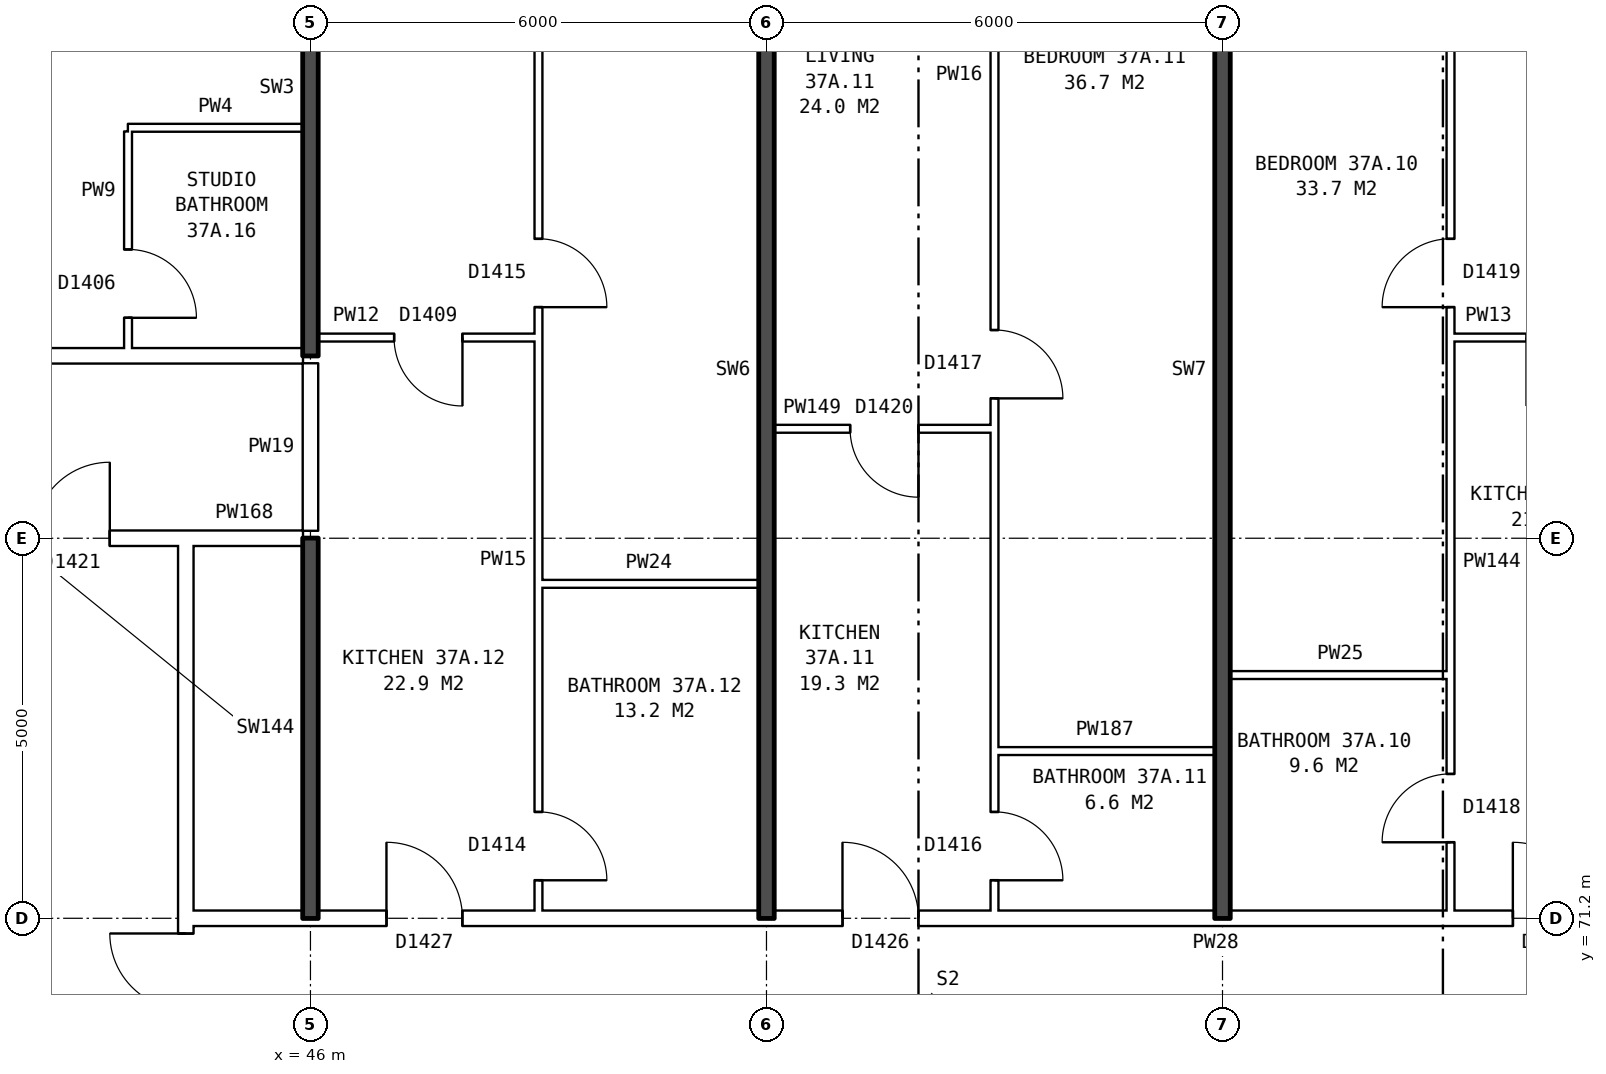
"""IFC4 building model, lengths in metres.
Left out: names, types, materials, properties, quantities, classifications, styles, units other than length and angle.
Written with IfcOpenShell. Run it as: python <this file> out.ifc"""

import sys

from ifc_helpers import new_model, si_unit, direction, frame, frame_2d, origin, place, context, subcontext, project, spatial, rectangle, extrude, element, fill, save


model = new_model("IFC4")
c1 = context("Model", 3, precision=1e-05, world=origin(), true_north=direction((0.0, 1.0)))
c2 = subcontext(c1, "Body", "Model", "MODEL_VIEW")
j1 = project(units=[si_unit("LENGTHUNIT", "METRE"), si_unit("PLANEANGLEUNIT", "RADIAN")], contexts=[c1])
p1 = place(None, origin())
s1 = spatial("IfcSite", under=j1, at=p1, CompositionType="ELEMENT")
p2 = place(p1, origin())
s2 = spatial("IfcBuilding", under=s1, at=p2, CompositionType="ELEMENT")
p3 = place(p2, frame((0.0, 0.0, 133.0)))
s3 = spatial("IfcBuildingStorey", under=s2, at=p3, CompositionType="ELEMENT", Elevation=133.0)
p4 = place(p3, frame((44.36, 63.9, 0.0), z_axis=(0.0, 0.0, 1.0), x_axis=(0.0, 1.0, 0.0)))
e1 = element("IfcWall", 1, at=p4, inside=s3, PredefinedType="PARTITIONING", context=c2, shape_type="SweptSolid", body=[
    extrude(rectangle(XDim=12.2, YDim=0.2, at=frame_2d((6.1, 0.0))), origin(), (0.0, 0.0, 1.0), 2.85),
])
p5 = place(p4, frame((5.1, 0.0, 0.0)))
e2 = element("IfcOpeningElement", 2, at=p5, cuts=e1, PredefinedType="OPENING", context=c2, shape_type="SweptSolid", body=[
    extrude(rectangle(XDim=2.0, YDim=2.1, at=frame_2d((1.0, 1.05))), frame((0.0, 0.11, 0.0), z_axis=(0.0, -1.0, 0.0), x_axis=(1.0, 0.0, 0.0)), (0.0, 0.0, 1.0), 0.22),
])
p6 = place(p3, frame((44.36, 71.2, 0.0), z_axis=(0.0, 0.0, 1.0), x_axis=(1.0, 0.0, 0.0)))
e3 = element("IfcWall", 3, at=p6, inside=s3, PredefinedType="PARTITIONING", context=c2, shape_type="SweptSolid", body=[
    extrude(rectangle(XDim=19.28, YDim=0.2, at=frame_2d((9.64, 0.0))), origin(), (0.0, 0.0, 1.0), 2.85),
])
p7 = place(p6, frame((17.46, 0.0, 0.0)))
e4 = element("IfcOpeningElement", 4, at=p7, cuts=e3, PredefinedType="OPENING", context=c2, shape_type="SweptSolid", body=[
    extrude(rectangle(XDim=1.0, YDim=2.1, at=frame_2d((0.5, 1.05))), frame((0.0, 0.11, 0.0), z_axis=(0.0, -1.0, 0.0), x_axis=(1.0, 0.0, 0.0)), (0.0, 0.0, 1.0), 0.22),
])
p8 = place(p6, frame((8.64, 0.0, 0.0)))
e5 = element("IfcOpeningElement", 5, at=p8, cuts=e3, PredefinedType="OPENING", context=c2, shape_type="SweptSolid", body=[
    extrude(rectangle(XDim=1.0, YDim=2.1, at=frame_2d((0.5, 1.05))), frame((0.0, 0.11, 0.0), z_axis=(0.0, -1.0, 0.0), x_axis=(1.0, 0.0, 0.0)), (0.0, 0.0, 1.0), 0.22),
])
p9 = place(p6, frame((2.64, 0.0, 0.0)))
e6 = element("IfcOpeningElement", 6, at=p9, cuts=e3, PredefinedType="OPENING", context=c2, shape_type="SweptSolid", body=[
    extrude(rectangle(XDim=1.0, YDim=2.1, at=frame_2d((0.5, 1.05))), frame((0.0, 0.11, 0.0), z_axis=(0.0, -1.0, 0.0), x_axis=(1.0, 0.0, 0.0)), (0.0, 0.0, 1.0), 0.22),
])
for number, where, z_axis, x_axis in (
    (7, (55.0, 73.4, 0.0), (0.0, 0.0, 1.0), (1.0, 0.0, 0.0)),
    (8, (58.1, 74.4, 0.0), (0.0, 0.0, 1.0), (1.0, 0.0, 0.0)),
    (9, (49.0, 75.6, 0.0), (0.0, 0.0, 1.0), (1.0, 0.0, 0.0)),
):
    element("IfcWall", number, at=place(p3, frame(where, z_axis=z_axis, x_axis=x_axis)), inside=s3, PredefinedType="PARTITIONING", context=c2, shape_type="SweptSolid", body=[
        extrude(rectangle(XDim=2.9, YDim=0.1, at=frame_2d((1.45, 0.0))), origin(), (0.0, 0.0, 1.0), 2.85),
    ])
p10 = place(p3, frame((41.36, 76.2, 0.0), z_axis=(0.0, 0.0, 1.0), x_axis=(1.0, 0.0, 0.0)))
e10 = element("IfcWall", 10, at=p10, inside=s3, PredefinedType="PARTITIONING", context=c2, shape_type="SweptSolid", body=[
    extrude(rectangle(XDim=3.0, YDim=0.2, at=frame_2d((1.5, 0.0))), origin(), (0.0, 0.0, 1.0), 2.85),
])
p11 = place(p10, frame((1.0, 0.0, 0.0)))
e11 = element("IfcOpeningElement", 11, at=p11, cuts=e10, PredefinedType="OPENING", context=c2, shape_type="SweptSolid", body=[
    extrude(rectangle(XDim=1.0, YDim=2.1, at=frame_2d((0.5, 1.05))), frame((0.0, 0.11, 0.0), z_axis=(0.0, -1.0, 0.0), x_axis=(1.0, 0.0, 0.0)), (0.0, 0.0, 1.0), 0.22),
])
p12 = place(p3, frame((44.36, 76.2, 0.0), z_axis=(0.0, 0.0, 1.0), x_axis=(1.0, 0.0, 0.0)))
e12 = element("IfcWall", 12, at=p12, inside=s3, PredefinedType="PARTITIONING", context=c2, shape_type="SweptSolid", body=[
    extrude(rectangle(XDim=1.54, YDim=0.2, at=frame_2d((0.77, 0.0))), origin(), (0.0, 0.0, 1.0), 2.85),
])
p13 = place(p3, frame((52.1, 77.64, 0.0), z_axis=(0.0, 0.0, 1.0), x_axis=(1.0, 0.0, 0.0)))
e13 = element("IfcWall", 13, at=p13, inside=s3, PredefinedType="PARTITIONING", context=c2, shape_type="SweptSolid", body=[
    extrude(rectangle(XDim=2.9, YDim=0.1, at=frame_2d((1.45, 0.0))), origin(), (0.0, 0.0, 1.0), 2.85),
])
p14 = place(p13, frame((1.0, 0.0, 0.0)))
e14 = element("IfcOpeningElement", 14, at=p14, cuts=e13, PredefinedType="OPENING", context=c2, shape_type="SweptSolid", body=[
    extrude(rectangle(XDim=0.9, YDim=2.1, at=frame_2d((0.45, 1.05))), frame((0.0, 0.06, 0.0), z_axis=(0.0, -1.0, 0.0), x_axis=(1.0, 0.0, 0.0)), (0.0, 0.0, 1.0), 0.12),
])
p15 = place(p3, frame((27.11, 78.6, 0.0), z_axis=(0.0, 0.0, 1.0), x_axis=(1.0, 0.0, 0.0)))
e15 = element("IfcWall", 15, at=p15, inside=s3, PredefinedType="PARTITIONING", context=c2, shape_type="SweptSolid", body=[
    extrude(rectangle(XDim=18.79, YDim=0.2, at=frame_2d((9.395, 0.0))), origin(), (0.0, 0.0, 1.0), 2.85),
])
p16 = place(p15, frame((14.19, 0.0, 0.0)))
e16 = element("IfcOpeningElement", 16, at=p16, cuts=e15, PredefinedType="OPENING", context=c2, shape_type="SweptSolid", body=[
    extrude(rectangle(XDim=1.0, YDim=2.1, at=frame_2d((0.5, 1.05))), frame((0.0, 0.11, 0.0), z_axis=(0.0, -1.0, 0.0), x_axis=(1.0, 0.0, 0.0)), (0.0, 0.0, 1.0), 0.22),
])
p17 = place(p15, frame((8.19, 0.0, 0.0)))
e17 = element("IfcOpeningElement", 17, at=p17, cuts=e15, PredefinedType="OPENING", context=c2, shape_type="SweptSolid", body=[
    extrude(rectangle(XDim=1.0, YDim=2.1, at=frame_2d((0.5, 1.05))), frame((0.0, 0.11, 0.0), z_axis=(0.0, -1.0, 0.0), x_axis=(1.0, 0.0, 0.0)), (0.0, 0.0, 1.0), 0.22),
])
p18 = place(p15, frame((4.59, 0.0, 0.0)))
e18 = element("IfcOpeningElement", 18, at=p18, cuts=e15, PredefinedType="OPENING", context=c2, shape_type="SweptSolid", body=[
    extrude(rectangle(XDim=1.0, YDim=2.1, at=frame_2d((0.5, 1.05))), frame((0.0, 0.11, 0.0), z_axis=(0.0, -1.0, 0.0), x_axis=(1.0, 0.0, 0.0)), (0.0, 0.0, 1.0), 0.22),
])
p19 = place(p3, frame((46.1, 78.84, 0.0), z_axis=(0.0, 0.0, 1.0), x_axis=(1.0, 0.0, 0.0)))
e19 = element("IfcWall", 19, at=p19, inside=s3, PredefinedType="PARTITIONING", context=c2, shape_type="SweptSolid", body=[
    extrude(rectangle(XDim=2.9, YDim=0.1, at=frame_2d((1.45, 0.0))), origin(), (0.0, 0.0, 1.0), 2.85),
])
p20 = place(p19, frame((1.0, 0.0, 0.0)))
e20 = element("IfcOpeningElement", 20, at=p20, cuts=e19, PredefinedType="OPENING", context=c2, shape_type="SweptSolid", body=[
    extrude(rectangle(XDim=0.9, YDim=2.1, at=frame_2d((0.45, 1.05))), frame((0.0, 0.06, 0.0), z_axis=(0.0, -1.0, 0.0), x_axis=(1.0, 0.0, 0.0)), (0.0, 0.0, 1.0), 0.12),
])
p21 = place(p3, frame((61.0, 78.84, 0.0), z_axis=(0.0, 0.0, 1.0), x_axis=(1.0, 0.0, 0.0)))
e21 = element("IfcWall", 21, at=p21, inside=s3, PredefinedType="PARTITIONING", context=c2, shape_type="SweptSolid", body=[
    extrude(rectangle(XDim=2.9, YDim=0.1, at=frame_2d((1.45, 0.0))), origin(), (0.0, 0.0, 1.0), 2.85),
])
p22 = place(p21, frame((1.0, 0.0, 0.0)))
e22 = element("IfcOpeningElement", 22, at=p22, cuts=e21, PredefinedType="OPENING", context=c2, shape_type="SweptSolid", body=[
    extrude(rectangle(XDim=0.9, YDim=2.1, at=frame_2d((0.45, 1.05))), frame((0.0, 0.06, 0.0), z_axis=(0.0, -1.0, 0.0), x_axis=(1.0, 0.0, 0.0)), (0.0, 0.0, 1.0), 0.12),
])
p23 = place(p3, frame((43.6, 81.6, 0.0), z_axis=(0.0, 0.0, 1.0), x_axis=(1.0, 0.0, 0.0)))
e23 = element("IfcWall", 23, at=p23, inside=s3, PredefinedType="PARTITIONING", context=c2, shape_type="SweptSolid", body=[
    extrude(rectangle(XDim=2.3, YDim=0.1, at=frame_2d((1.15, 0.0))), origin(), (0.0, 0.0, 1.0), 2.85),
])
p24 = place(p3, frame((43.6, 78.7, 0.0), z_axis=(0.0, 0.0, 1.0), x_axis=(0.0, 1.0, 0.0)))
e24 = element("IfcWall", 24, at=p24, inside=s3, PredefinedType="PARTITIONING", context=c2, shape_type="SweptSolid", body=[
    extrude(rectangle(XDim=2.85, YDim=0.1, at=frame_2d((1.425, 0.0))), origin(), (0.0, 0.0, 1.0), 2.85),
])
p25 = place(p24, frame((0.4, 0.0, 0.0)))
e25 = element("IfcOpeningElement", 25, at=p25, cuts=e24, PredefinedType="OPENING", context=c2, shape_type="SweptSolid", body=[
    extrude(rectangle(XDim=0.9, YDim=2.1, at=frame_2d((0.45, 1.05))), frame((0.0, 0.06, 0.0), z_axis=(0.0, -1.0, 0.0), x_axis=(1.0, 0.0, 0.0)), (0.0, 0.0, 1.0), 0.12),
])
p26 = place(p3, frame((46.0, 71.2, 0.0), z_axis=(0.0, 0.0, 1.0), x_axis=(0.0, 1.0, 0.0)))
e26 = element("IfcWall", 26, at=p26, inside=s3, PredefinedType="SOLIDWALL", context=c2, shape_type="SweptSolid", body=[
    extrude(rectangle(XDim=5.0, YDim=0.2, at=frame_2d((2.5, 0.0))), origin(), (0.0, 0.0, 1.0), 2.85),
])
p27 = place(p3, frame((46.0, 76.3, 0.0), z_axis=(0.0, 0.0, 1.0), x_axis=(0.0, 1.0, 0.0)))
e27 = element("IfcWall", 27, at=p27, inside=s3, PredefinedType="PARTITIONING", context=c2, shape_type="SweptSolid", body=[
    extrude(rectangle(XDim=2.2, YDim=0.2, at=frame_2d((1.1, 0.0))), origin(), (0.0, 0.0, 1.0), 2.85),
])
p28 = place(p3, frame((46.0, 78.6, 0.0), z_axis=(0.0, 0.0, 1.0), x_axis=(0.0, 1.0, 0.0)))
e28 = element("IfcWall", 28, at=p28, inside=s3, PredefinedType="SOLIDWALL", context=c2, shape_type="SweptSolid", body=[
    extrude(rectangle(XDim=7.04, YDim=0.2, at=frame_2d((3.52, 0.0))), origin(), (0.0, 0.0, 1.0), 2.85),
])
p29 = place(p3, frame((49.0, 71.3, 0.0), z_axis=(0.0, 0.0, 1.0), x_axis=(0.0, 1.0, 0.0)))
e29 = element("IfcWall", 29, at=p29, inside=s3, PredefinedType="PARTITIONING", context=c2, shape_type="SweptSolid", body=[
    extrude(rectangle(XDim=14.34, YDim=0.1, at=frame_2d((7.17, 0.0))), origin(), (0.0, 0.0, 1.0), 2.85),
])
p30 = place(p29, frame((7.94, 0.0, 0.0)))
e30 = element("IfcOpeningElement", 30, at=p30, cuts=e29, PredefinedType="OPENING", context=c2, shape_type="SweptSolid", body=[
    extrude(rectangle(XDim=0.9, YDim=2.1, at=frame_2d((0.45, 1.05))), frame((0.0, 0.06, 0.0), z_axis=(0.0, -1.0, 0.0), x_axis=(1.0, 0.0, 0.0)), (0.0, 0.0, 1.0), 0.12),
])
p31 = place(p29, frame((0.4, 0.0, 0.0)))
e31 = element("IfcOpeningElement", 31, at=p31, cuts=e29, PredefinedType="OPENING", context=c2, shape_type="SweptSolid", body=[
    extrude(rectangle(XDim=0.9, YDim=2.1, at=frame_2d((0.45, 1.05))), frame((0.0, 0.06, 0.0), z_axis=(0.0, -1.0, 0.0), x_axis=(1.0, 0.0, 0.0)), (0.0, 0.0, 1.0), 0.12),
])
p32 = place(p3, frame((52.0, 71.2, 0.0), z_axis=(0.0, 0.0, 1.0), x_axis=(0.0, 1.0, 0.0)))
e32 = element("IfcWall", 32, at=p32, inside=s3, PredefinedType="SOLIDWALL", context=c2, shape_type="SweptSolid", body=[
    extrude(rectangle(XDim=14.44, YDim=0.2, at=frame_2d((7.22, 0.0))), origin(), (0.0, 0.0, 1.0), 2.85),
])
p33 = place(p3, frame((55.0, 71.3, 0.0), z_axis=(0.0, 0.0, 1.0), x_axis=(0.0, 1.0, 0.0)))
e33 = element("IfcWall", 33, at=p33, inside=s3, PredefinedType="PARTITIONING", context=c2, shape_type="SweptSolid", body=[
    extrude(rectangle(XDim=14.34, YDim=0.1, at=frame_2d((7.17, 0.0))), origin(), (0.0, 0.0, 1.0), 2.85),
])
p34 = place(p33, frame((6.74, 0.0, 0.0)))
e34 = element("IfcOpeningElement", 34, at=p34, cuts=e33, PredefinedType="OPENING", context=c2, shape_type="SweptSolid", body=[
    extrude(rectangle(XDim=0.9, YDim=2.1, at=frame_2d((0.45, 1.05))), frame((0.0, 0.06, 0.0), z_axis=(0.0, -1.0, 0.0), x_axis=(1.0, 0.0, 0.0)), (0.0, 0.0, 1.0), 0.12),
])
p35 = place(p33, frame((0.4, 0.0, 0.0)))
e35 = element("IfcOpeningElement", 35, at=p35, cuts=e33, PredefinedType="OPENING", context=c2, shape_type="SweptSolid", body=[
    extrude(rectangle(XDim=0.9, YDim=2.1, at=frame_2d((0.45, 1.05))), frame((0.0, 0.06, 0.0), z_axis=(0.0, -1.0, 0.0), x_axis=(1.0, 0.0, 0.0)), (0.0, 0.0, 1.0), 0.12),
])
p36 = place(p3, frame((58.0, 71.2, 0.0), z_axis=(0.0, 0.0, 1.0), x_axis=(0.0, 1.0, 0.0)))
e36 = element("IfcWall", 36, at=p36, inside=s3, PredefinedType="SOLIDWALL", context=c2, shape_type="SweptSolid", body=[
    extrude(rectangle(XDim=14.44, YDim=0.2, at=frame_2d((7.22, 0.0))), origin(), (0.0, 0.0, 1.0), 2.85),
])
p37 = place(p3, frame((61.0, 71.3, 0.0), z_axis=(0.0, 0.0, 1.0), x_axis=(0.0, 1.0, 0.0)))
e37 = element("IfcWall", 37, at=p37, inside=s3, PredefinedType="PARTITIONING", context=c2, shape_type="SweptSolid", body=[
    extrude(rectangle(XDim=14.34, YDim=0.1, at=frame_2d((7.17, 0.0))), origin(), (0.0, 0.0, 1.0), 2.85),
])
p38 = place(p37, frame((7.94, 0.0, 0.0)))
e38 = element("IfcOpeningElement", 38, at=p38, cuts=e37, PredefinedType="OPENING", context=c2, shape_type="SweptSolid", body=[
    extrude(rectangle(XDim=0.9, YDim=2.1, at=frame_2d((0.45, 1.05))), frame((0.0, 0.06, 0.0), z_axis=(0.0, -1.0, 0.0), x_axis=(1.0, 0.0, 0.0)), (0.0, 0.0, 1.0), 0.12),
])
p39 = place(p37, frame((0.9, 0.0, 0.0)))
e39 = element("IfcOpeningElement", 39, at=p39, cuts=e37, PredefinedType="OPENING", context=c2, shape_type="SweptSolid", body=[
    extrude(rectangle(XDim=0.9, YDim=2.1, at=frame_2d((0.45, 1.05))), frame((0.0, 0.06, 0.0), z_axis=(0.0, -1.0, 0.0), x_axis=(1.0, 0.0, 0.0)), (0.0, 0.0, 1.0), 0.12),
])
p40 = place(p5, origin())
e40 = element("IfcDoor", 40, at=p40, inside=s3, OperationType="DOUBLE_DOOR_SINGLE_SWING", PredefinedType="DOOR", context=c2, shape_type="SweptSolid", body=[
    extrude(rectangle(XDim=2.0, YDim=2.1, at=frame_2d((1.0, 1.05))), frame((0.0, 0.025, 0.0), z_axis=(0.0, -1.0, 0.0), x_axis=(1.0, 0.0, 0.0)), (0.0, 0.0, 1.0), 0.05),
])
fill(e2, e40)
p41 = place(p11, origin())
e41 = element("IfcDoor", 41, at=p41, inside=s3, OperationType="SINGLE_SWING_RIGHT", PredefinedType="DOOR", context=c2, shape_type="SweptSolid", body=[
    extrude(rectangle(XDim=1.0, YDim=2.1, at=frame_2d((0.5, 1.05))), frame((0.0, 0.025, 0.0), z_axis=(0.0, -1.0, 0.0), x_axis=(1.0, 0.0, 0.0)), (0.0, 0.0, 1.0), 0.05),
])
fill(e11, e41)
p42 = place(p38, origin())
e42 = element("IfcDoor", 42, at=p42, inside=s3, OperationType="SINGLE_SWING_LEFT", PredefinedType="DOOR", context=c2, shape_type="SweptSolid", body=[
    extrude(rectangle(XDim=0.9, YDim=2.1, at=frame_2d((0.45, 1.05))), frame((0.0, 0.025, 0.0), z_axis=(0.0, -1.0, 0.0), x_axis=(1.0, 0.0, 0.0)), (0.0, 0.0, 1.0), 0.05),
])
fill(e38, e42)
p43 = place(p7, origin())
e43 = element("IfcDoor", 43, at=p43, inside=s3, OperationType="SINGLE_SWING_LEFT", PredefinedType="DOOR", context=c2, shape_type="SweptSolid", body=[
    extrude(rectangle(XDim=1.0, YDim=2.1, at=frame_2d((0.5, 1.05))), frame((0.0, 0.025, 0.0), z_axis=(0.0, -1.0, 0.0), x_axis=(1.0, 0.0, 0.0)), (0.0, 0.0, 1.0), 0.05),
])
fill(e4, e43)
p44 = place(p39, origin())
e44 = element("IfcDoor", 44, at=p44, inside=s3, OperationType="SINGLE_SWING_LEFT", PredefinedType="DOOR", context=c2, shape_type="SweptSolid", body=[
    extrude(rectangle(XDim=0.9, YDim=2.1, at=frame_2d((0.45, 1.05))), frame((0.0, 0.025, 0.0), z_axis=(0.0, -1.0, 0.0), x_axis=(1.0, 0.0, 0.0)), (0.0, 0.0, 1.0), 0.05),
])
fill(e39, e44)
p45 = place(p34, frame((0.9, 0.0, 0.0), z_axis=(0.0, 0.0, 1.0), x_axis=(-1.0, 0.0, 0.0)))
e45 = element("IfcDoor", 45, at=p45, inside=s3, OperationType="SINGLE_SWING_RIGHT", PredefinedType="DOOR", context=c2, shape_type="SweptSolid", body=[
    extrude(rectangle(XDim=0.9, YDim=2.1, at=frame_2d((0.45, 1.05))), frame((0.0, 0.025, 0.0), z_axis=(0.0, -1.0, 0.0), x_axis=(1.0, 0.0, 0.0)), (0.0, 0.0, 1.0), 0.05),
])
fill(e34, e45)
p46 = place(p8, origin())
e46 = element("IfcDoor", 46, at=p46, inside=s3, OperationType="SINGLE_SWING_LEFT", PredefinedType="DOOR", context=c2, shape_type="SweptSolid", body=[
    extrude(rectangle(XDim=1.0, YDim=2.1, at=frame_2d((0.5, 1.05))), frame((0.0, 0.025, 0.0), z_axis=(0.0, -1.0, 0.0), x_axis=(1.0, 0.0, 0.0)), (0.0, 0.0, 1.0), 0.05),
])
fill(e5, e46)
p47 = place(p14, frame((0.9, 0.0, 0.0), z_axis=(0.0, 0.0, 1.0), x_axis=(-1.0, 0.0, 0.0)))
e47 = element("IfcDoor", 47, at=p47, inside=s3, OperationType="SINGLE_SWING_LEFT", PredefinedType="DOOR", context=c2, shape_type="SweptSolid", body=[
    extrude(rectangle(XDim=0.9, YDim=2.1, at=frame_2d((0.45, 1.05))), frame((0.0, 0.025, 0.0), z_axis=(0.0, -1.0, 0.0), x_axis=(1.0, 0.0, 0.0)), (0.0, 0.0, 1.0), 0.05),
])
fill(e14, e47)
p48 = place(p35, frame((0.9, 0.0, 0.0), z_axis=(0.0, 0.0, 1.0), x_axis=(-1.0, 0.0, 0.0)))
e48 = element("IfcDoor", 48, at=p48, inside=s3, OperationType="SINGLE_SWING_RIGHT", PredefinedType="DOOR", context=c2, shape_type="SweptSolid", body=[
    extrude(rectangle(XDim=0.9, YDim=2.1, at=frame_2d((0.45, 1.05))), frame((0.0, 0.025, 0.0), z_axis=(0.0, -1.0, 0.0), x_axis=(1.0, 0.0, 0.0)), (0.0, 0.0, 1.0), 0.05),
])
fill(e35, e48)
p49 = place(p30, frame((0.9, 0.0, 0.0), z_axis=(0.0, 0.0, 1.0), x_axis=(-1.0, 0.0, 0.0)))
e49 = element("IfcDoor", 49, at=p49, inside=s3, OperationType="SINGLE_SWING_RIGHT", PredefinedType="DOOR", context=c2, shape_type="SweptSolid", body=[
    extrude(rectangle(XDim=0.9, YDim=2.1, at=frame_2d((0.45, 1.05))), frame((0.0, 0.025, 0.0), z_axis=(0.0, -1.0, 0.0), x_axis=(1.0, 0.0, 0.0)), (0.0, 0.0, 1.0), 0.05),
])
fill(e30, e49)
p50 = place(p9, origin())
e50 = element("IfcDoor", 50, at=p50, inside=s3, OperationType="SINGLE_SWING_LEFT", PredefinedType="DOOR", context=c2, shape_type="SweptSolid", body=[
    extrude(rectangle(XDim=1.0, YDim=2.1, at=frame_2d((0.5, 1.05))), frame((0.0, 0.025, 0.0), z_axis=(0.0, -1.0, 0.0), x_axis=(1.0, 0.0, 0.0)), (0.0, 0.0, 1.0), 0.05),
])
fill(e6, e50)
p51 = place(p20, frame((0.9, 0.0, 0.0), z_axis=(0.0, 0.0, 1.0), x_axis=(-1.0, 0.0, 0.0)))
e51 = element("IfcDoor", 51, at=p51, inside=s3, OperationType="SINGLE_SWING_LEFT", PredefinedType="DOOR", context=c2, shape_type="SweptSolid", body=[
    extrude(rectangle(XDim=0.9, YDim=2.1, at=frame_2d((0.45, 1.05))), frame((0.0, 0.025, 0.0), z_axis=(0.0, -1.0, 0.0), x_axis=(1.0, 0.0, 0.0)), (0.0, 0.0, 1.0), 0.05),
])
fill(e20, e51)
p52 = place(p31, frame((0.9, 0.0, 0.0), z_axis=(0.0, 0.0, 1.0), x_axis=(-1.0, 0.0, 0.0)))
e52 = element("IfcDoor", 52, at=p52, inside=s3, OperationType="SINGLE_SWING_RIGHT", PredefinedType="DOOR", context=c2, shape_type="SweptSolid", body=[
    extrude(rectangle(XDim=0.9, YDim=2.1, at=frame_2d((0.45, 1.05))), frame((0.0, 0.025, 0.0), z_axis=(0.0, -1.0, 0.0), x_axis=(1.0, 0.0, 0.0)), (0.0, 0.0, 1.0), 0.05),
])
fill(e31, e52)
p53 = place(p25, frame((0.9, 0.0, 0.0), z_axis=(0.0, 0.0, 1.0), x_axis=(-1.0, 0.0, 0.0)))
e53 = element("IfcDoor", 53, at=p53, inside=s3, OperationType="SINGLE_SWING_RIGHT", PredefinedType="DOOR", context=c2, shape_type="SweptSolid", body=[
    extrude(rectangle(XDim=0.9, YDim=2.1, at=frame_2d((0.45, 1.05))), frame((0.0, 0.025, 0.0), z_axis=(0.0, -1.0, 0.0), x_axis=(1.0, 0.0, 0.0)), (0.0, 0.0, 1.0), 0.05),
])
fill(e25, e53)
save(model, sys.argv[1])
